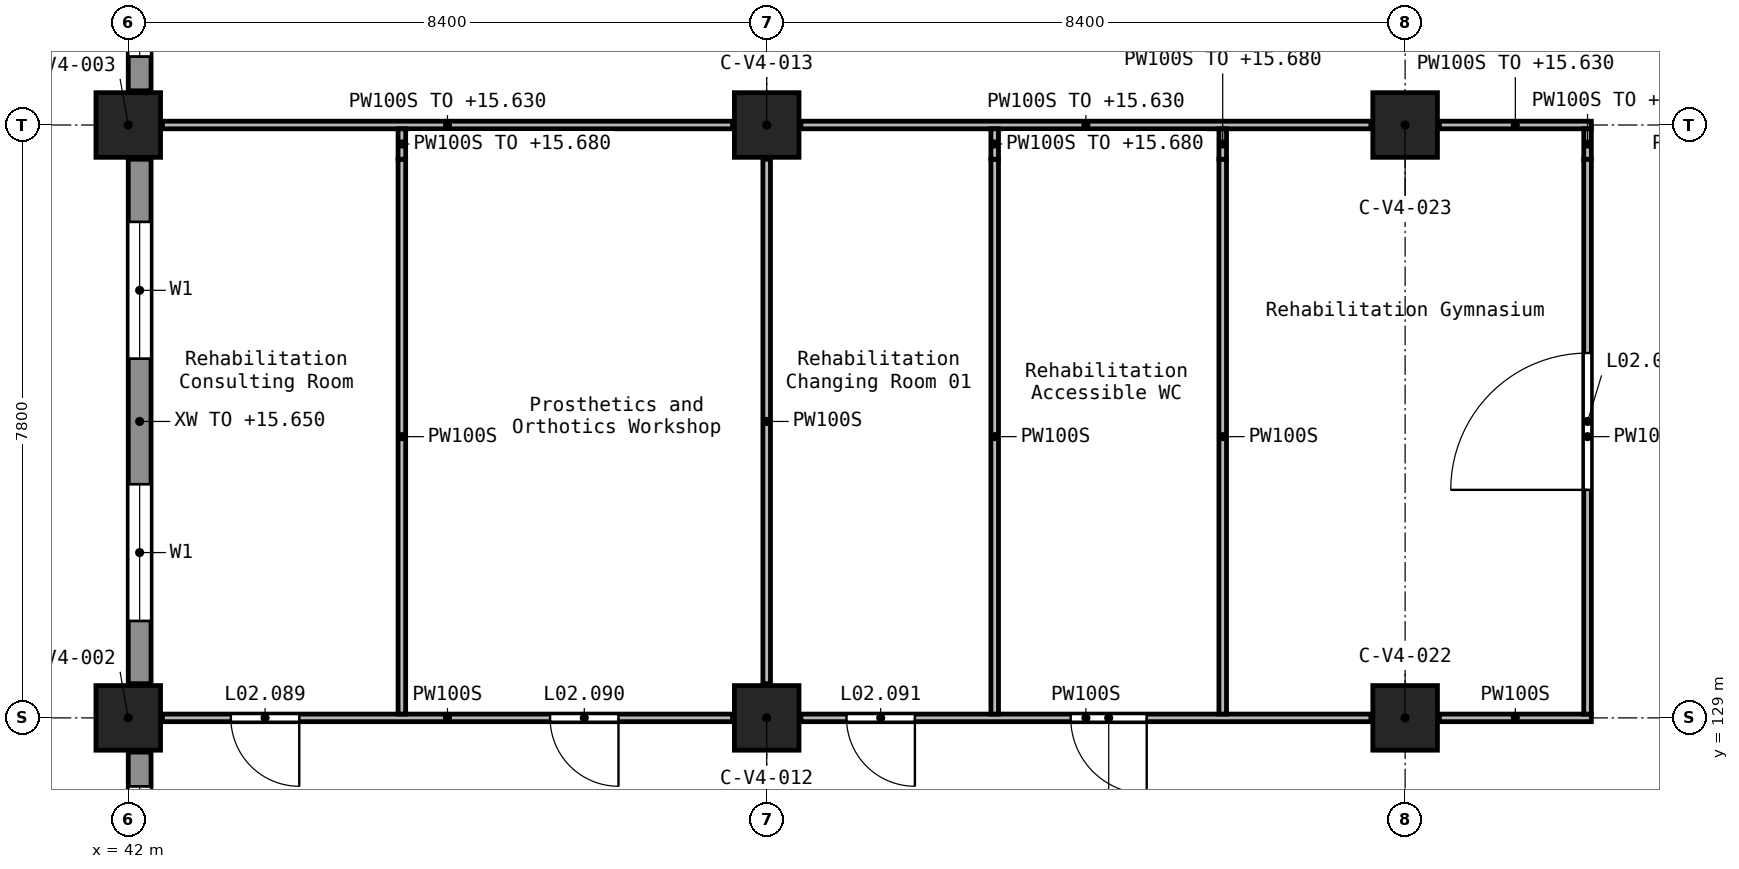
"""IFC4 building model, lengths in metres.
Left out: names, types, materials, properties, quantities, classifications, styles, units other than length and angle.
Written with IfcOpenShell. Run it as: python <this file> out.ifc"""

import sys

from ifc_helpers import new_model, si_unit, direction, frame, frame_2d, origin, origin_2d, place, context, subcontext, project, spatial, rectangle, extrude, element, fill, save


model = new_model("IFC4")
c1 = context("Model", 3, precision=1e-05, world=origin(), true_north=direction((0.0, 1.0)))
c2 = subcontext(c1, "Body", "Model", "MODEL_VIEW")
j1 = project(units=[si_unit("LENGTHUNIT", "METRE"), si_unit("PLANEANGLEUNIT", "RADIAN")], contexts=[c1])
p1 = place(None, origin())
s1 = spatial("IfcSite", under=j1, at=p1, CompositionType="ELEMENT")
p2 = place(p1, origin())
s2 = spatial("IfcBuilding", under=s1, at=p2, CompositionType="ELEMENT")
p3 = place(p2, frame((0.0, 0.0, 12.6)))
s3 = spatial("IfcBuildingStorey", under=s2, at=p3, CompositionType="ELEMENT", Elevation=12.6)
for number, where, z_axis, x_axis in (
    (1, (42.0, 129.0, 0.0), (0.0, 0.0, 1.0), (1.0, 0.0, 0.0)),
    (2, (42.0, 136.8, 0.0), (0.0, 0.0, 1.0), (1.0, 0.0, 0.0)),
    (3, (50.4, 129.0, 0.0), (0.0, 0.0, 1.0), (1.0, 0.0, 0.0)),
    (4, (50.4, 136.8, 0.0), (0.0, 0.0, 1.0), (1.0, 0.0, 0.0)),
    (5, (58.8, 129.0, 0.0), (0.0, 0.0, 1.0), (1.0, 0.0, 0.0)),
    (6, (58.8, 136.8, 0.0), (0.0, 0.0, 1.0), (1.0, 0.0, 0.0)),
):
    element("IfcColumn", number, at=place(p3, frame(where, z_axis=z_axis, x_axis=x_axis)), inside=s3, PredefinedType="COLUMN", context=c2, shape_type="SweptSolid", body=[
        extrude(rectangle(XDim=0.85, YDim=0.85, at=origin_2d()), origin(), (0.0, 0.0, 1.0), 4.2),
    ])
p4 = place(p3, frame((42.15, 139.95, 0.0), z_axis=(0.0, 0.0, 1.0), x_axis=(0.0, -1.0, 0.0)))
e7 = element("IfcWall", 7, at=p4, inside=s3, PredefinedType="STANDARD", context=c2, shape_type="SweptSolid", body=[
    extrude(rectangle(XDim=2.7, YDim=0.3, at=frame_2d((1.35, 0.0))), origin(), (0.0, 0.0, 1.0), 3.05),
])
p5 = place(p4, frame((0.45, 0.0, 0.9)))
e8 = element("IfcOpeningElement", 8, at=p5, cuts=e7, PredefinedType="OPENING", context=c2, shape_type="SweptSolid", body=[
    extrude(rectangle(XDim=1.8, YDim=1.5, at=frame_2d((0.9, 0.75))), frame((0.0, 0.16, 0.0), z_axis=(0.0, -1.0, 0.0), x_axis=(1.0, 0.0, 0.0)), (0.0, 0.0, 1.0), 0.32),
])
p6 = place(p3, frame((42.15, 136.35, 0.0), z_axis=(0.0, 0.0, 1.0), x_axis=(0.0, -1.0, 0.0)))
e9 = element("IfcWall", 9, at=p6, inside=s3, PredefinedType="STANDARD", context=c2, shape_type="SweptSolid", body=[
    extrude(rectangle(XDim=6.9, YDim=0.3, at=frame_2d((3.45, 0.0))), origin(), (0.0, 0.0, 1.0), 3.05),
])
p7 = place(p6, frame((0.825, 0.0, 0.9)))
e10 = element("IfcOpeningElement", 10, at=p7, cuts=e9, PredefinedType="OPENING", context=c2, shape_type="SweptSolid", body=[
    extrude(rectangle(XDim=1.8, YDim=1.5, at=frame_2d((0.9, 0.75))), frame((0.0, 0.16, 0.0), z_axis=(0.0, -1.0, 0.0), x_axis=(1.0, 0.0, 0.0)), (0.0, 0.0, 1.0), 0.32),
])
p8 = place(p6, frame((4.275, 0.0, 0.9)))
e11 = element("IfcOpeningElement", 11, at=p8, cuts=e9, PredefinedType="OPENING", context=c2, shape_type="SweptSolid", body=[
    extrude(rectangle(XDim=1.8, YDim=1.5, at=frame_2d((0.9, 0.75))), frame((0.0, 0.16, 0.0), z_axis=(0.0, -1.0, 0.0), x_axis=(1.0, 0.0, 0.0)), (0.0, 0.0, 1.0), 0.32),
])
p9 = place(p3, frame((42.15, 128.55, 0.0), z_axis=(0.0, 0.0, 1.0), x_axis=(0.0, -1.0, 0.0)))
e12 = element("IfcWall", 12, at=p9, inside=s3, PredefinedType="STANDARD", context=c2, shape_type="SweptSolid", body=[
    extrude(rectangle(XDim=2.7, YDim=0.3, at=frame_2d((1.35, 0.0))), origin(), (0.0, 0.0, 1.0), 3.05),
])
p10 = place(p9, frame((0.45, 0.0, 0.9)))
e13 = element("IfcOpeningElement", 13, at=p10, cuts=e12, PredefinedType="OPENING", context=c2, shape_type="SweptSolid", body=[
    extrude(rectangle(XDim=1.8, YDim=1.5, at=frame_2d((0.9, 0.75))), frame((0.0, 0.16, 0.0), z_axis=(0.0, -1.0, 0.0), x_axis=(1.0, 0.0, 0.0)), (0.0, 0.0, 1.0), 0.32),
])
p11 = place(p3, frame((61.25, 129.0, 0.0), z_axis=(0.0, 0.0, 1.0), x_axis=(-1.0, 0.0, 0.0)))
e14 = element("IfcWall", 14, at=p11, inside=s3, PredefinedType="PARTITIONING", context=c2, shape_type="SweptSolid", body=[
    extrude(rectangle(XDim=2.0, YDim=0.1, at=frame_2d((1.0, 0.0))), origin(), (0.0, 0.0, 1.0), 3.85),
])
p12 = place(p3, frame((58.35, 129.0, 0.0), z_axis=(0.0, 0.0, 1.0), x_axis=(-1.0, 0.0, 0.0)))
e15 = element("IfcWall", 15, at=p12, inside=s3, PredefinedType="PARTITIONING", context=c2, shape_type="SweptSolid", body=[
    extrude(rectangle(XDim=7.5, YDim=0.1, at=frame_2d((3.75, 0.0))), origin(), (0.0, 0.0, 1.0), 3.85),
])
p13 = place(p12, frame((6.0, 0.0, 0.0)))
e16 = element("IfcOpeningElement", 16, at=p13, cuts=e15, PredefinedType="OPENING", context=c2, shape_type="SweptSolid", body=[
    extrude(rectangle(XDim=0.9, YDim=2.1, at=frame_2d((0.45, 1.05))), frame((0.0, 0.06, 0.0), z_axis=(0.0, -1.0, 0.0), x_axis=(1.0, 0.0, 0.0)), (0.0, 0.0, 1.0), 0.12),
])
p14 = place(p12, frame((2.95, 0.0, 0.0)))
e17 = element("IfcOpeningElement", 17, at=p14, cuts=e15, PredefinedType="OPENING", context=c2, shape_type="SweptSolid", body=[
    extrude(rectangle(XDim=1.0, YDim=2.1, at=frame_2d((0.5, 1.05))), frame((0.0, 0.06, 0.0), z_axis=(0.0, -1.0, 0.0), x_axis=(1.0, 0.0, 0.0)), (0.0, 0.0, 1.0), 0.12),
])
p15 = place(p3, frame((49.95, 129.0, 0.0), z_axis=(0.0, 0.0, 1.0), x_axis=(-1.0, 0.0, 0.0)))
e18 = element("IfcWall", 18, at=p15, inside=s3, PredefinedType="PARTITIONING", context=c2, shape_type="SweptSolid", body=[
    extrude(rectangle(XDim=7.5, YDim=0.1, at=frame_2d((3.75, 0.0))), origin(), (0.0, 0.0, 1.0), 3.85),
])
p16 = place(p15, frame((5.7, 0.0, 0.0)))
e19 = element("IfcOpeningElement", 19, at=p16, cuts=e18, PredefinedType="OPENING", context=c2, shape_type="SweptSolid", body=[
    extrude(rectangle(XDim=0.9, YDim=2.1, at=frame_2d((0.45, 1.05))), frame((0.0, 0.06, 0.0), z_axis=(0.0, -1.0, 0.0), x_axis=(1.0, 0.0, 0.0)), (0.0, 0.0, 1.0), 0.12),
])
p17 = place(p15, frame((1.5, 0.0, 0.0)))
e20 = element("IfcOpeningElement", 20, at=p17, cuts=e18, PredefinedType="OPENING", context=c2, shape_type="SweptSolid", body=[
    extrude(rectangle(XDim=0.9, YDim=2.1, at=frame_2d((0.45, 1.05))), frame((0.0, 0.06, 0.0), z_axis=(0.0, -1.0, 0.0), x_axis=(1.0, 0.0, 0.0)), (0.0, 0.0, 1.0), 0.12),
])
p18 = place(p3, frame((61.25, 136.8, 0.0), z_axis=(0.0, 0.0, 1.0), x_axis=(-1.0, 0.0, 0.0)))
e21 = element("IfcWall", 21, at=p18, inside=s3, PredefinedType="PARTITIONING", context=c2, shape_type="SweptSolid", body=[
    extrude(rectangle(XDim=2.0, YDim=0.1, at=frame_2d((1.0, 0.0))), origin(), (0.0, 0.0, 1.0), 3.03),
])
for number, where, z_axis, x_axis in (
    (22, (58.35, 136.8, 0.0), (0.0, 0.0, 1.0), (-1.0, 0.0, 0.0)),
    (23, (49.95, 136.8, 0.0), (0.0, 0.0, 1.0), (-1.0, 0.0, 0.0)),
):
    element("IfcWall", number, at=place(p3, frame(where, z_axis=z_axis, x_axis=x_axis)), inside=s3, PredefinedType="PARTITIONING", context=c2, shape_type="SweptSolid", body=[
        extrude(rectangle(XDim=7.5, YDim=0.1, at=frame_2d((3.75, 0.0))), origin(), (0.0, 0.0, 1.0), 3.03),
    ])
p19 = place(p3, frame((45.6, 129.05, 0.0), z_axis=(0.0, 0.0, 1.0), x_axis=(0.0, 1.0, 0.0)))
e24 = element("IfcWall", 24, at=p19, inside=s3, PredefinedType="PARTITIONING", context=c2, shape_type="SweptSolid", body=[
    extrude(rectangle(XDim=7.3, YDim=0.1, at=frame_2d((3.65, 0.0))), origin(), (0.0, 0.0, 1.0), 3.85),
])
p20 = place(p3, frame((45.6, 136.35, 0.0), z_axis=(0.0, 0.0, 1.0), x_axis=(0.0, 1.0, 0.0)))
e25 = element("IfcWall", 25, at=p20, inside=s3, PredefinedType="PARTITIONING", context=c2, shape_type="SweptSolid", body=[
    extrude(rectangle(XDim=0.4, YDim=0.1, at=frame_2d((0.2, 0.0))), origin(), (0.0, 0.0, 1.0), 3.08),
])
p21 = place(p3, frame((50.4, 129.45, 0.0), z_axis=(0.0, 0.0, 1.0), x_axis=(0.0, 1.0, 0.0)))
e26 = element("IfcWall", 26, at=p21, inside=s3, PredefinedType="PARTITIONING", context=c2, shape_type="SweptSolid", body=[
    extrude(rectangle(XDim=6.9, YDim=0.1, at=frame_2d((3.45, 0.0))), origin(), (0.0, 0.0, 1.0), 3.85),
])
p22 = place(p3, frame((53.4, 129.05, 0.0), z_axis=(0.0, 0.0, 1.0), x_axis=(0.0, 1.0, 0.0)))
e27 = element("IfcWall", 27, at=p22, inside=s3, PredefinedType="PARTITIONING", context=c2, shape_type="SweptSolid", body=[
    extrude(rectangle(XDim=7.3, YDim=0.1, at=frame_2d((3.65, 0.0))), origin(), (0.0, 0.0, 1.0), 3.85),
])
p23 = place(p3, frame((53.4, 136.35, 0.0), z_axis=(0.0, 0.0, 1.0), x_axis=(0.0, 1.0, 0.0)))
e28 = element("IfcWall", 28, at=p23, inside=s3, PredefinedType="PARTITIONING", context=c2, shape_type="SweptSolid", body=[
    extrude(rectangle(XDim=0.4, YDim=0.1, at=frame_2d((0.2, 0.0))), origin(), (0.0, 0.0, 1.0), 3.08),
])
p24 = place(p3, frame((56.4, 129.05, 0.0), z_axis=(0.0, 0.0, 1.0), x_axis=(0.0, 1.0, 0.0)))
e29 = element("IfcWall", 29, at=p24, inside=s3, PredefinedType="PARTITIONING", context=c2, shape_type="SweptSolid", body=[
    extrude(rectangle(XDim=7.3, YDim=0.1, at=frame_2d((3.65, 0.0))), origin(), (0.0, 0.0, 1.0), 3.85),
])
p25 = place(p3, frame((56.4, 136.35, 0.0), z_axis=(0.0, 0.0, 1.0), x_axis=(0.0, 1.0, 0.0)))
e30 = element("IfcWall", 30, at=p25, inside=s3, PredefinedType="PARTITIONING", context=c2, shape_type="SweptSolid", body=[
    extrude(rectangle(XDim=0.4, YDim=0.1, at=frame_2d((0.2, 0.0))), origin(), (0.0, 0.0, 1.0), 3.08),
])
p26 = place(p3, frame((61.2, 129.05, 0.0), z_axis=(0.0, 0.0, 1.0), x_axis=(0.0, 1.0, 0.0)))
e31 = element("IfcWall", 31, at=p26, inside=s3, PredefinedType="PARTITIONING", context=c2, shape_type="SweptSolid", body=[
    extrude(rectangle(XDim=7.3, YDim=0.1, at=frame_2d((3.65, 0.0))), origin(), (0.0, 0.0, 1.0), 3.85),
])
p27 = place(p26, frame((2.95, 0.0, 0.0)))
e32 = element("IfcOpeningElement", 32, at=p27, cuts=e31, PredefinedType="OPENING", context=c2, shape_type="SweptSolid", body=[
    extrude(rectangle(XDim=1.8, YDim=2.1, at=frame_2d((0.9, 1.05))), frame((0.0, 0.06, 0.0), z_axis=(0.0, -1.0, 0.0), x_axis=(1.0, 0.0, 0.0)), (0.0, 0.0, 1.0), 0.12),
])
p28 = place(p3, frame((61.2, 136.35, 0.0), z_axis=(0.0, 0.0, 1.0), x_axis=(0.0, 1.0, 0.0)))
e33 = element("IfcWall", 33, at=p28, inside=s3, PredefinedType="PARTITIONING", context=c2, shape_type="SweptSolid", body=[
    extrude(rectangle(XDim=0.4, YDim=0.1, at=frame_2d((0.2, 0.0))), origin(), (0.0, 0.0, 1.0), 3.08),
])
p29 = place(p5, origin())
e34 = element("IfcWindow", 34, at=p29, inside=s3, PartitioningType="SINGLE_PANEL", PredefinedType="WINDOW", context=c2, shape_type="SweptSolid", body=[
    extrude(rectangle(XDim=1.8, YDim=1.5, at=frame_2d((0.9, 0.75))), frame((0.0, 0.03, 0.0), z_axis=(0.0, -1.0, 0.0), x_axis=(1.0, 0.0, 0.0)), (0.0, 0.0, 1.0), 0.06),
])
fill(e8, e34)
p30 = place(p7, origin())
e35 = element("IfcWindow", 35, at=p30, inside=s3, PartitioningType="SINGLE_PANEL", PredefinedType="WINDOW", context=c2, shape_type="SweptSolid", body=[
    extrude(rectangle(XDim=1.8, YDim=1.5, at=frame_2d((0.9, 0.75))), frame((0.0, 0.03, 0.0), z_axis=(0.0, -1.0, 0.0), x_axis=(1.0, 0.0, 0.0)), (0.0, 0.0, 1.0), 0.06),
])
fill(e10, e35)
p31 = place(p8, origin())
e36 = element("IfcWindow", 36, at=p31, inside=s3, PartitioningType="SINGLE_PANEL", PredefinedType="WINDOW", context=c2, shape_type="SweptSolid", body=[
    extrude(rectangle(XDim=1.8, YDim=1.5, at=frame_2d((0.9, 0.75))), frame((0.0, 0.03, 0.0), z_axis=(0.0, -1.0, 0.0), x_axis=(1.0, 0.0, 0.0)), (0.0, 0.0, 1.0), 0.06),
])
fill(e11, e36)
p32 = place(p10, origin())
e37 = element("IfcWindow", 37, at=p32, inside=s3, PartitioningType="SINGLE_PANEL", PredefinedType="WINDOW", context=c2, shape_type="SweptSolid", body=[
    extrude(rectangle(XDim=1.8, YDim=1.5, at=frame_2d((0.9, 0.75))), frame((0.0, 0.03, 0.0), z_axis=(0.0, -1.0, 0.0), x_axis=(1.0, 0.0, 0.0)), (0.0, 0.0, 1.0), 0.06),
])
fill(e13, e37)
p33 = place(p16, frame((0.9, 0.0, 0.0), z_axis=(0.0, 0.0, 1.0), x_axis=(-1.0, 0.0, 0.0)))
e38 = element("IfcDoor", 38, at=p33, inside=s3, OperationType="SINGLE_SWING_LEFT", PredefinedType="DOOR", context=c2, shape_type="SweptSolid", body=[
    extrude(rectangle(XDim=0.9, YDim=2.1, at=frame_2d((0.45, 1.05))), frame((0.0, 0.025, 0.0), z_axis=(0.0, -1.0, 0.0), x_axis=(1.0, 0.0, 0.0)), (0.0, 0.0, 1.0), 0.05),
])
fill(e19, e38)
p34 = place(p17, frame((0.9, 0.0, 0.0), z_axis=(0.0, 0.0, 1.0), x_axis=(-1.0, 0.0, 0.0)))
e39 = element("IfcDoor", 39, at=p34, inside=s3, OperationType="SINGLE_SWING_RIGHT", PredefinedType="DOOR", context=c2, shape_type="SweptSolid", body=[
    extrude(rectangle(XDim=0.9, YDim=2.1, at=frame_2d((0.45, 1.05))), frame((0.0, 0.025, 0.0), z_axis=(0.0, -1.0, 0.0), x_axis=(1.0, 0.0, 0.0)), (0.0, 0.0, 1.0), 0.05),
])
fill(e20, e39)
p35 = place(p13, frame((0.9, 0.0, 0.0), z_axis=(0.0, 0.0, 1.0), x_axis=(-1.0, 0.0, 0.0)))
e40 = element("IfcDoor", 40, at=p35, inside=s3, OperationType="SINGLE_SWING_LEFT", PredefinedType="DOOR", context=c2, shape_type="SweptSolid", body=[
    extrude(rectangle(XDim=0.9, YDim=2.1, at=frame_2d((0.45, 1.05))), frame((0.0, 0.025, 0.0), z_axis=(0.0, -1.0, 0.0), x_axis=(1.0, 0.0, 0.0)), (0.0, 0.0, 1.0), 0.05),
])
fill(e16, e40)
p36 = place(p14, frame((1.0, 0.0, 0.0), z_axis=(0.0, 0.0, 1.0), x_axis=(-1.0, 0.0, 0.0)))
e41 = element("IfcDoor", 41, at=p36, inside=s3, OperationType="SINGLE_SWING_RIGHT", PredefinedType="DOOR", context=c2, shape_type="SweptSolid", body=[
    extrude(rectangle(XDim=1.0, YDim=2.1, at=frame_2d((0.5, 1.05))), frame((0.0, 0.025, 0.0), z_axis=(0.0, -1.0, 0.0), x_axis=(1.0, 0.0, 0.0)), (0.0, 0.0, 1.0), 0.05),
])
fill(e17, e41)
p37 = place(p27, origin())
e42 = element("IfcDoor", 42, at=p37, inside=s3, OperationType="DOUBLE_DOOR_SINGLE_SWING", PredefinedType="DOOR", context=c2, shape_type="SweptSolid", body=[
    extrude(rectangle(XDim=1.8, YDim=2.1, at=frame_2d((0.9, 1.05))), frame((0.0, 0.025, 0.0), z_axis=(0.0, -1.0, 0.0), x_axis=(1.0, 0.0, 0.0)), (0.0, 0.0, 1.0), 0.05),
])
fill(e32, e42)
save(model, sys.argv[1])
